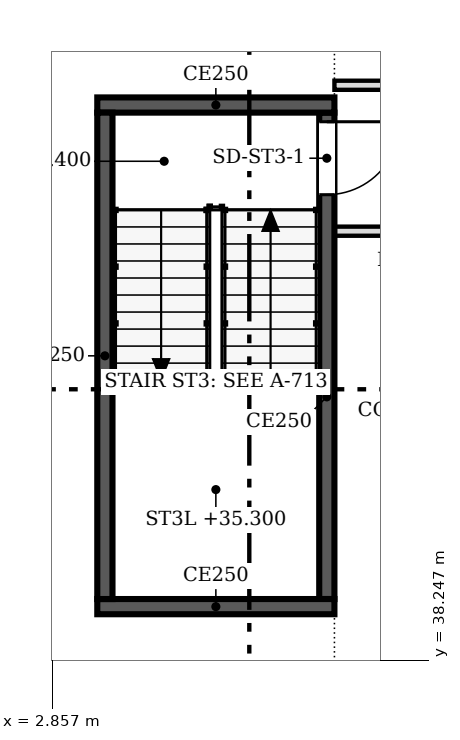
"""IFC4 building model, lengths in metres.
Left out: names, types, materials, properties, quantities, classifications, styles, units other than length and angle.
Written with IfcOpenShell. Run it as: python <this file> out.ifc"""

import sys

from ifc_helpers import new_model, si_unit, direction, frame, frame_2d, origin, place, context, subcontext, project, spatial, rectangle, extrude, source, transform, mapped, element, fill, save


model = new_model("IFC4")
c1 = context("Model", 3, precision=1e-05, world=origin(), true_north=direction((0.0, 1.0)))
c2 = subcontext(c1, "Body", "Model", "MODEL_VIEW")
j1 = project(units=[si_unit("LENGTHUNIT", "METRE"), si_unit("PLANEANGLEUNIT", "RADIAN")], contexts=[c1])
p1 = place(None, origin())
s1 = spatial("IfcSite", under=j1, at=p1, CompositionType="ELEMENT")
p2 = place(p1, origin())
s2 = spatial("IfcBuilding", under=s1, at=p2, CompositionType="ELEMENT")
p3 = place(p2, frame((0.0, 0.0, 33.4)))
s3 = spatial("IfcBuildingStorey", under=s2, at=p3, CompositionType="ELEMENT", Elevation=33.4)
p4 = place(p3, frame((7.5, 39.125, 0.0), z_axis=(0.0, 0.0, 1.0), x_axis=(-1.0, 0.0, 0.0)))
e1 = element("IfcWall", 1, at=p4, inside=s3, PredefinedType="SOLIDWALL", context=c2, shape_type="SweptSolid", body=[
    extrude(rectangle(XDim=3.9, YDim=0.25, at=frame_2d((1.95, 0.0))), origin(), (0.0, 0.0, 1.0), 3.8),
])
p5 = place(p3, frame((3.725, 39.25, 0.0), z_axis=(0.0, 0.0, 1.0), x_axis=(0.0, 1.0, 0.0)))
e2 = element("IfcWall", 2, at=p5, inside=s3, PredefinedType="SOLIDWALL", context=c2, shape_type="SweptSolid", body=[
    extrude(rectangle(XDim=8.0, YDim=0.25, at=frame_2d((4.0, 0.0))), origin(), (0.0, 0.0, 1.0), 3.8),
])
p6 = place(p3, frame((3.6, 47.375, 0.0), z_axis=(0.0, 0.0, 1.0), x_axis=(1.0, 0.0, 0.0)))
e3 = element("IfcWall", 3, at=p6, inside=s3, PredefinedType="SOLIDWALL", context=c2, shape_type="SweptSolid", body=[
    extrude(rectangle(XDim=3.9, YDim=0.25, at=frame_2d((1.95, 0.0))), origin(), (0.0, 0.0, 1.0), 3.8),
])
p7 = place(p3, frame((7.375, 47.25, 0.0), z_axis=(0.0, 0.0, 1.0), x_axis=(0.0, -1.0, 0.0)))
e4 = element("IfcWall", 4, at=p7, inside=s3, PredefinedType="SOLIDWALL", context=c2, shape_type="SweptSolid", body=[
    extrude(rectangle(XDim=8.0, YDim=0.25, at=frame_2d((4.0, 0.0))), origin(), (0.0, 0.0, 1.0), 3.8),
])
m1 = source(origin(), c2, "Body", "SweptSolid", [
    extrude(rectangle(XDim=1.2, YDim=2.1, at=frame_2d((0.6, 1.05))), frame((0.0, 0.135, 0.0), z_axis=(0.0, -1.0, 0.0), x_axis=(1.0, 0.0, 0.0)), (0.0, 0.0, 1.0), 0.27),
])
p8 = place(p7, frame((0.15, 0.0, 0.0)))
e5 = element("IfcOpeningElement", 5, at=p8, cuts=e4, PredefinedType="OPENING", context=c2, shape_type="MappedRepresentation", body=[
    mapped(m1, transform((0.0, 0.0, 0.0), scale=1.0)),
])
p9 = place(p3, frame((28.024, 45.3, 0.0), z_axis=(0.0, 0.0, 1.0), x_axis=(-1.0, 0.0, 0.0)))
e6 = element("IfcWall", 6, at=p9, inside=s3, PredefinedType="PARTITIONING", context=c2, shape_type="SweptSolid", body=[
    extrude(rectangle(XDim=20.524, YDim=0.15, at=frame_2d((10.262, 0.0))), origin(), (0.0, 0.0, 1.0), 3.067),
])
m2 = source(origin(), c2, "Body", "SweptSolid", [
    extrude(rectangle(XDim=1.0, YDim=2.1, at=frame_2d((0.5, 1.05))), frame((0.0, 0.085, 0.0), z_axis=(0.0, -1.0, 0.0), x_axis=(1.0, 0.0, 0.0)), (0.0, 0.0, 1.0), 0.17),
])
p10 = place(p9, frame((17.724, 0.0, 0.0)))
e7 = element("IfcOpeningElement", 7, at=p10, cuts=e6, PredefinedType="OPENING", context=c2, shape_type="MappedRepresentation", body=[
    mapped(m2, transform((0.0, 0.0, 0.0), scale=1.0)),
])
p11 = place(p3, frame((7.5, 47.7, 0.0), z_axis=(0.0, 0.0, 1.0), x_axis=(1.0, 0.0, 0.0)))
e8 = element("IfcWall", 8, at=p11, inside=s3, PredefinedType="PARTITIONING", context=c2, shape_type="SweptSolid", body=[
    extrude(rectangle(XDim=20.6, YDim=0.15, at=frame_2d((10.3, 0.0))), origin(), (0.0, 0.0, 1.0), 3.067),
])
p12 = place(p11, frame((15.301, 0.0, 0.0)))
e9 = element("IfcOpeningElement", 9, at=p12, cuts=e8, PredefinedType="OPENING", context=c2, shape_type="MappedRepresentation", body=[
    mapped(m2, transform((0.0, 0.0, 0.0), scale=1.0)),
])
p13 = place(p11, frame((5.6, 0.0, 0.0)))
e10 = element("IfcOpeningElement", 10, at=p13, cuts=e8, PredefinedType="OPENING", context=c2, shape_type="MappedRepresentation", body=[
    mapped(m2, transform((0.0, 0.0, 0.0), scale=1.0)),
])
m3 = source(origin(), c2, "Body", "SweptSolid", [
    extrude(rectangle(XDim=1.2, YDim=2.1, at=frame_2d((0.6, 1.05))), frame((0.0, 0.025, 0.0), z_axis=(0.0, -1.0, 0.0), x_axis=(1.0, 0.0, 0.0)), (0.0, 0.0, 1.0), 0.05),
])
p14 = place(p8, origin())
e11 = element("IfcDoor", 11, at=p14, inside=s3, OperationType="SINGLE_SWING_LEFT", PredefinedType="DOOR", context=c2, shape_type="MappedRepresentation", body=[
    mapped(m3, transform((0.0, 0.0, 0.0), scale=1.0)),
])
fill(e5, e11)
save(model, sys.argv[1])
